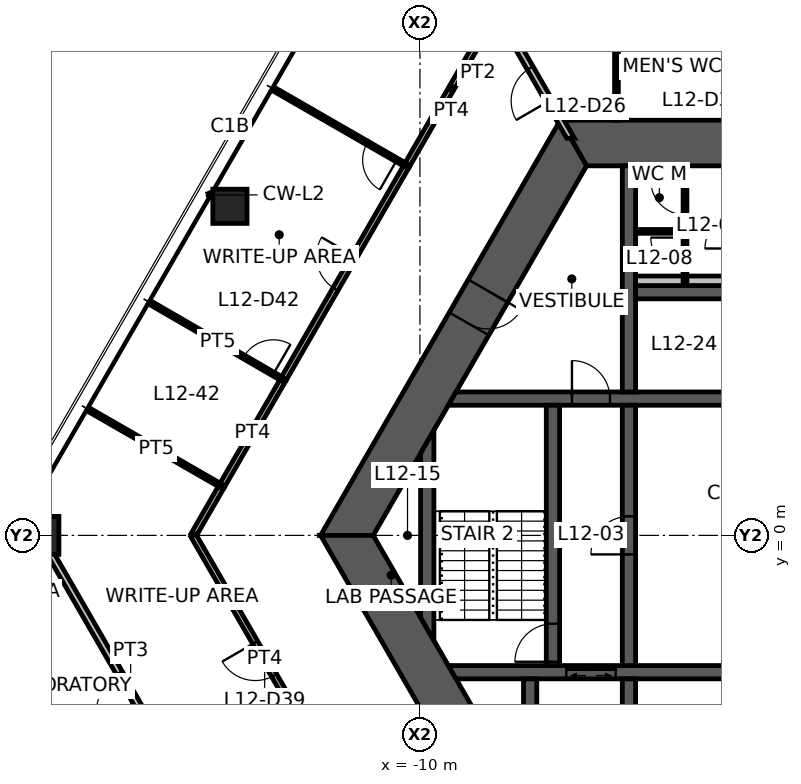
"""IFC4 building model, lengths in metres.
Left out: names, types, materials, properties, quantities, classifications, styles, units other than length and angle.
Written with IfcOpenShell. Run it as: python <this file> out.ifc"""

import sys

from ifc_helpers import new_model, si_unit, direction, frame, frame_2d, origin, origin_2d, place, context, subcontext, project, spatial, polyline, rectangle, hollow_rectangle, outline, extrude, element, fill, save


model = new_model("IFC4")
c1 = context("Model", 3, precision=1e-05, world=origin(), true_north=direction((0.0, 1.0)))
c2 = subcontext(c1, "Body", "Model", "MODEL_VIEW")
j1 = project(units=[si_unit("LENGTHUNIT", "METRE"), si_unit("PLANEANGLEUNIT", "RADIAN")], contexts=[c1])
p1 = place(None, origin())
s1 = spatial("IfcSite", under=j1, at=p1, CompositionType="ELEMENT")
p2 = place(p1, origin())
s2 = spatial("IfcBuilding", under=s1, at=p2, CompositionType="ELEMENT")
p3 = place(p2, frame((0.0, 0.0, 47.8)))
s3 = spatial("IfcBuildingStorey", under=s2, at=p3, CompositionType="ELEMENT", Elevation=47.8)
p4 = place(p3, frame((-20.0, 0.0, 0.0), z_axis=(0.0, 0.0, 1.0), x_axis=(1.0, 0.0, 0.0)))
e1 = element("IfcColumn", 1, at=p4, inside=s3, PredefinedType="COLUMN", context=c2, shape_type="SweptSolid", body=[
    extrude(hollow_rectangle(XDim=1.0, YDim=1.0, WallThickness=0.06, at=origin_2d()), origin(), (0.0, 0.0, 1.0), 4.2),
])
p5 = place(p3, frame((-15.0, 8.66, 0.0), z_axis=(0.0, 0.0, 1.0), x_axis=(1.0, 0.0, 0.0)))
e2 = element("IfcColumn", 2, at=p5, inside=s3, PredefinedType="COLUMN", context=c2, shape_type="SweptSolid", body=[
    extrude(hollow_rectangle(XDim=0.9, YDim=0.9, WallThickness=0.05, at=origin_2d()), origin(), (0.0, 0.0, 1.0), 4.2),
])
p6 = place(p3, frame((5.961, 10.325, 0.0), z_axis=(0.0, 0.0, 1.0), x_axis=(-1.0, 0.0, 0.0)))
e3 = element("IfcWall", 3, at=p6, inside=s3, PredefinedType="SHEAR", context=c2, shape_type="SweptSolid", body=[
    extrude(outline(polyline([(-0.346, -0.6), (4.574, -0.6), (5.474, -0.6), (6.449, -0.6), (7.349, -0.6), (12.269, -0.6), (11.576, 0.6), (7.349, 0.6), (6.449, 0.6), (5.474, 0.6), (4.574, 0.6), (0.346, 0.6), (-0.346, -0.6)])), origin(), (0.0, 0.0, 1.0), 4.2),
])
p7 = place(p6, frame((6.449, 0.0, 0.0)))
e4 = element("IfcOpeningElement", 4, at=p7, cuts=e3, PredefinedType="OPENING", context=c2, shape_type="SweptSolid", body=[
    extrude(rectangle(XDim=0.9, YDim=2.1, at=frame_2d((0.45, 1.05))), frame((0.0, 0.61, 0.0), z_axis=(0.0, -1.0, 0.0), x_axis=(1.0, 0.0, 0.0)), (0.0, 0.0, 1.0), 1.22),
])
p8 = place(p6, frame((4.574, 0.0, 0.0)))
e5 = element("IfcOpeningElement", 5, at=p8, cuts=e3, PredefinedType="OPENING", context=c2, shape_type="SweptSolid", body=[
    extrude(rectangle(XDim=0.9, YDim=2.1, at=frame_2d((0.45, 1.05))), frame((0.0, 0.61, 0.0), z_axis=(0.0, -1.0, 0.0), x_axis=(1.0, 0.0, 0.0)), (0.0, 0.0, 1.0), 1.22),
])
p9 = place(p3, frame((-5.961, 10.325, 0.0), z_axis=(0.0, 0.0, 1.0), x_axis=(-0.500004296715, -0.866022923061, 0.0)))
e6 = element("IfcWall", 6, at=p9, inside=s3, PredefinedType="SHEAR", context=c2, shape_type="SweptSolid", body=[
    extrude(outline(polyline([(-0.346, -0.6), (4.494, -0.6), (5.494, -0.6), (12.269, -0.6), (11.576, 0.6), (5.494, 0.6), (4.494, 0.6), (0.346, 0.6), (-0.346, -0.6)])), origin(), (0.0, 0.0, 1.0), 4.2),
])
p10 = place(p9, frame((4.494, 0.0, 0.0)))
e7 = element("IfcOpeningElement", 7, at=p10, cuts=e6, PredefinedType="OPENING", context=c2, shape_type="SweptSolid", body=[
    extrude(rectangle(XDim=1.0, YDim=2.1, at=frame_2d((0.5, 1.05))), frame((0.0, 0.61, 0.0), z_axis=(0.0, -1.0, 0.0), x_axis=(1.0, 0.0, 0.0)), (0.0, 0.0, 1.0), 1.22),
])
p11 = place(p3, frame((-11.922, 0.0, 0.0), z_axis=(0.0, 0.0, 1.0), x_axis=(0.500004296715, -0.866022923061, 0.0)))
e8 = element("IfcWall", 8, at=p11, inside=s3, PredefinedType="SHEAR", context=c2, shape_type="SweptSolid", body=[
    extrude(outline(polyline([(-0.346, -0.6), (6.431, -0.6), (7.231, -0.6), (12.269, -0.6), (11.576, 0.6), (7.231, 0.6), (6.431, 0.6), (0.346, 0.6), (-0.346, -0.6)])), origin(), (0.0, 0.0, 1.0), 4.2),
])
p12 = place(p11, frame((6.431, 0.0, 0.0)))
e9 = element("IfcOpeningElement", 9, at=p12, cuts=e8, PredefinedType="OPENING", context=c2, shape_type="SweptSolid", body=[
    extrude(rectangle(XDim=0.8, YDim=2.1, at=frame_2d((0.4, 1.05))), frame((0.0, 0.61, 0.0), z_axis=(0.0, -1.0, 0.0), x_axis=(1.0, 0.0, 0.0)), (0.0, 0.0, 1.0), 1.22),
])
p13 = place(p3, frame((-9.151, 3.6, 0.0), z_axis=(0.0, 0.0, 1.0), x_axis=(1.0, 0.0, 0.0)))
e10 = element("IfcWall", 10, at=p13, inside=s3, PredefinedType="SHEAR", context=c2, shape_type="SweptSolid", body=[
    extrude(outline(polyline([(-0.101, -0.175), (3.151, -0.175), (4.151, -0.175), (7.726, -0.175), (7.726, 0.175), (4.151, 0.175), (3.151, 0.175), (0.101, 0.175), (-0.101, -0.175)])), origin(), (0.0, 0.0, 1.0), 4.2),
])
p14 = place(p13, frame((3.151, 0.0, 0.0)))
e11 = element("IfcOpeningElement", 11, at=p14, cuts=e10, PredefinedType="OPENING", context=c2, shape_type="SweptSolid", body=[
    extrude(rectangle(XDim=1.0, YDim=2.1, at=frame_2d((0.5, 1.05))), frame((0.0, 0.185, 0.0), z_axis=(0.0, -1.0, 0.0), x_axis=(1.0, 0.0, 0.0)), (0.0, 0.0, 1.0), 0.37),
])
p15 = place(p3, frame((-9.151, -3.6, 0.0), z_axis=(0.0, 0.0, 1.0), x_axis=(1.0, 0.0, 0.0)))
e12 = element("IfcWall", 12, at=p15, inside=s3, PredefinedType="SHEAR", context=c2, shape_type="SweptSolid", body=[
    extrude(outline(polyline([(0.101, -0.175), (3.001, -0.175), (4.301, -0.175), (7.726, -0.175), (7.726, 0.175), (4.301, 0.175), (3.001, 0.175), (-0.101, 0.175), (0.101, -0.175)])), origin(), (0.0, 0.0, 1.0), 4.2),
])
p16 = place(p15, frame((3.001, 0.0, 0.0)))
e13 = element("IfcOpeningElement", 13, at=p16, cuts=e12, PredefinedType="OPENING", context=c2, shape_type="SweptSolid", body=[
    extrude(rectangle(XDim=1.3, YDim=2.1, at=frame_2d((0.65, 1.05))), frame((0.0, 0.185, 0.0), z_axis=(0.0, -1.0, 0.0), x_axis=(1.0, 0.0, 0.0)), (0.0, 0.0, 1.0), 0.37),
])
p17 = place(p3, frame((-4.5, -3.425, 0.0), z_axis=(0.0, 0.0, 1.0), x_axis=(0.0, 1.0, 0.0)))
e14 = element("IfcWall", 14, at=p17, inside=s3, PredefinedType="SHEAR", context=c2, shape_type="SweptSolid", body=[
    extrude(rectangle(XDim=6.85, YDim=0.35, at=frame_2d((3.425, 0.0))), origin(), (0.0, 0.0, 1.0), 4.2),
])
p18 = place(p17, frame((2.925, 0.0, 0.0)))
e15 = element("IfcOpeningElement", 15, at=p18, cuts=e14, PredefinedType="OPENING", context=c2, shape_type="SweptSolid", body=[
    extrude(rectangle(XDim=1.0, YDim=2.1, at=frame_2d((0.5, 1.05))), frame((0.0, 0.185, 0.0), z_axis=(0.0, -1.0, 0.0), x_axis=(1.0, 0.0, 0.0)), (0.0, 0.0, 1.0), 0.37),
])
p19 = place(p3, frame((-6.5, -3.425, 0.0), z_axis=(0.0, 0.0, 1.0), x_axis=(0.0, 1.0, 0.0)))
e16 = element("IfcWall", 16, at=p19, inside=s3, PredefinedType="SHEAR", context=c2, shape_type="SweptSolid", body=[
    extrude(rectangle(XDim=6.85, YDim=0.35, at=frame_2d((3.425, 0.0))), origin(), (0.0, 0.0, 1.0), 4.2),
])
p20 = place(p19, frame((0.1, 0.0, 0.0)))
e17 = element("IfcOpeningElement", 17, at=p20, cuts=e16, PredefinedType="OPENING", context=c2, shape_type="SweptSolid", body=[
    extrude(rectangle(XDim=1.0, YDim=2.1, at=frame_2d((0.5, 1.05))), frame((0.0, 0.185, 0.0), z_axis=(0.0, -1.0, 0.0), x_axis=(1.0, 0.0, 0.0)), (0.0, 0.0, 1.0), 0.37),
])
for number, where, z_axis, x_axis in (
    (18, (-4.5, 3.775, 0.0), (0.0, 0.0, 1.0), (0.0, 1.0, 0.0)),
    (19, (-4.5, -3.775, 0.0), (0.0, 0.0, 1.0), (0.0, -1.0, 0.0)),
):
    element("IfcWall", number, at=place(p3, frame(where, z_axis=z_axis, x_axis=x_axis)), inside=s3, PredefinedType="SHEAR", context=c2, shape_type="SweptSolid", body=[
        extrude(rectangle(XDim=5.95, YDim=0.35, at=frame_2d((2.975, 0.0))), origin(), (0.0, 0.0, 1.0), 4.2),
    ])
p21 = place(p3, frame((-4.325, 6.4, 0.0), z_axis=(0.0, 0.0, 1.0), x_axis=(1.0, 0.0, 0.0)))
e20 = element("IfcWall", 20, at=p21, inside=s3, PredefinedType="SHEAR", context=c2, shape_type="SweptSolid", body=[
    extrude(rectangle(XDim=2.55, YDim=0.35, at=frame_2d((1.275, 0.0))), origin(), (0.0, 0.0, 1.0), 4.2),
])
p22 = place(p3, frame((-7.1, -3.775, 0.0), z_axis=(0.0, 0.0, 1.0), x_axis=(0.0, -1.0, 0.0)))
e21 = element("IfcWall", 21, at=p22, inside=s3, PredefinedType="SHEAR", context=c2, shape_type="SweptSolid", body=[
    extrude(outline(polyline([(0.0, -0.175), (3.074, -0.175), (3.377, 0.0), (3.4, 0.175), (0.0, 0.175), (0.0, -0.175)])), origin(), (0.0, 0.0, 1.0), 4.2),
])
p23 = place(p3, frame((-9.808, -2.462, 0.0), z_axis=(0.0, 0.0, 1.0), x_axis=(0.0, 1.0, 0.0)))
e22 = element("IfcWall", 22, at=p23, inside=s3, PredefinedType="SHEAR", context=c2, shape_type="SweptSolid", body=[
    extrude(outline(polyline([(-0.303, -0.175), (5.228, -0.175), (4.621, 0.175), (0.303, 0.175), (-0.303, -0.175)])), origin(), (0.0, 0.0, 1.0), 4.2),
])
p24 = place(p3, frame((-4.325, 6.7, 0.0), z_axis=(0.0, 0.0, 1.0), x_axis=(1.0, 0.0, 0.0)))
e23 = element("IfcWall", 23, at=p24, inside=s3, PredefinedType="PLUMBINGWALL", context=c2, shape_type="SweptSolid", body=[
    extrude(rectangle(XDim=2.55, YDim=0.25, at=frame_2d((1.275, 0.0))), origin(), (0.0, 0.0, 1.0), 4.2),
])
p25 = place(p3, frame((-3.025, 6.575, 0.0), z_axis=(0.0, 0.0, 1.0), x_axis=(0.0, 1.0, 0.0)))
e24 = element("IfcWall", 24, at=p25, inside=s3, PredefinedType="PARTITIONING", context=c2, shape_type="SweptSolid", body=[
    extrude(rectangle(XDim=3.15, YDim=0.1, at=frame_2d((1.575, 0.0))), origin(), (0.0, 0.0, 1.0), 2.65),
])
p26 = place(p25, frame((1.863, 0.0, 0.0)))
e25 = element("IfcOpeningElement", 25, at=p26, cuts=e24, PredefinedType="OPENING", context=c2, shape_type="SweptSolid", body=[
    extrude(rectangle(XDim=0.9, YDim=2.1, at=frame_2d((0.45, 1.05))), frame((0.0, 0.06, 0.0), z_axis=(0.0, -1.0, 0.0), x_axis=(1.0, 0.0, 0.0)), (0.0, 0.0, 1.0), 0.12),
])
p27 = place(p25, frame((0.363, 0.0, 0.0)))
e26 = element("IfcOpeningElement", 26, at=p27, cuts=e24, PredefinedType="OPENING", context=c2, shape_type="SweptSolid", body=[
    extrude(rectangle(XDim=0.9, YDim=2.1, at=frame_2d((0.45, 1.05))), frame((0.0, 0.06, 0.0), z_axis=(0.0, -1.0, 0.0), x_axis=(1.0, 0.0, 0.0)), (0.0, 0.0, 1.0), 0.12),
])
p28 = place(p3, frame((-3.075, 8.0, 0.0), z_axis=(0.0, 0.0, 1.0), x_axis=(-1.0, 0.0, 0.0)))
e27 = element("IfcWall", 27, at=p28, inside=s3, PredefinedType="PARTITIONING", context=c2, shape_type="SweptSolid", body=[
    extrude(rectangle(XDim=1.25, YDim=0.1, at=frame_2d((0.625, 0.0))), origin(), (0.0, 0.0, 1.0), 2.65),
])
p29 = place(p3, frame((-6.035, 10.453, 0.0), z_axis=(0.0, 0.0, 1.0), x_axis=(-0.499993402427, 0.866029212861, 0.0)))
e28 = element("IfcWall", 28, at=p29, inside=s3, PredefinedType="PARTITIONING", context=c2, shape_type="SweptSolid", body=[
    extrude(outline(polyline([(-0.051, -0.087), (1.129, -0.087), (2.129, -0.087), (7.93, -0.087), (7.93, 0.087), (2.129, 0.087), (1.129, 0.087), (0.051, 0.087), (-0.051, -0.087)])), origin(), (0.0, 0.0, 1.0), 3.05),
])
p30 = place(p29, frame((1.129, 0.0, 0.0)))
e29 = element("IfcOpeningElement", 29, at=p30, cuts=e28, PredefinedType="OPENING", context=c2, shape_type="SweptSolid", body=[
    extrude(rectangle(XDim=1.0, YDim=2.1, at=frame_2d((0.5, 1.05))), frame((0.0, 0.098, 0.0), z_axis=(0.0, -1.0, 0.0), x_axis=(1.0, 0.0, 0.0)), (0.0, 0.0, 1.0), 0.195),
])
p31 = place(p3, frame((-4.829, 10.925, 0.0), z_axis=(0.0, 0.0, 1.0), x_axis=(0.0, 1.0, 0.0)))
e30 = element("IfcWall", 30, at=p31, inside=s3, PredefinedType="PARTITIONING", context=c2, shape_type="SweptSolid", body=[
    extrude(rectangle(XDim=5.0, YDim=0.1, at=frame_2d((2.5, 0.0))), origin(), (0.0, 0.0, 1.0), 2.65),
])
p32 = place(p3, frame((-15.225, -8.271, 0.0), z_axis=(0.0, 0.0, 1.0), x_axis=(-0.499993908199, 0.866028920859, 0.0)))
e31 = element("IfcWall", 31, at=p32, inside=s3, PredefinedType="PARTITIONING", context=c2, shape_type="SweptSolid", body=[
    extrude(rectangle(XDim=9.55, YDim=0.175, at=frame_2d((4.775, 0.0))), origin(), (0.0, 0.0, 1.0), 2.95),
])
p33 = place(p32, frame((4.175, 0.0, 0.0)))
e32 = element("IfcOpeningElement", 32, at=p33, cuts=e31, PredefinedType="OPENING", context=c2, shape_type="SweptSolid", body=[
    extrude(rectangle(XDim=1.2, YDim=2.1, at=frame_2d((0.6, 1.05))), frame((0.0, 0.098, 0.0), z_axis=(0.0, -1.0, 0.0), x_axis=(1.0, 0.0, 0.0)), (0.0, 0.0, 1.0), 0.195),
])
p34 = place(p3, frame((-10.352, 9.719, 0.0), z_axis=(0.0, 0.0, 1.0), x_axis=(0.499985273446, 0.866033905998, 0.0)))
e33 = element("IfcWall", 33, at=p34, inside=s3, PredefinedType="PARTITIONING", context=c2, shape_type="SweptSolid", body=[
    extrude(rectangle(XDim=4.718, YDim=0.15, at=frame_2d((2.359, 0.0))), origin(), (0.0, 0.0, 1.0), 2.65),
])
p35 = place(p3, frame((-15.222, 1.285, 0.0), z_axis=(0.0, 0.0, 1.0), x_axis=(0.499969057507, 0.866043267704, 0.0)))
e34 = element("IfcWall", 34, at=p35, inside=s3, PredefinedType="PARTITIONING", context=c2, shape_type="SweptSolid", body=[
    extrude(rectangle(XDim=3.257, YDim=0.15, at=frame_2d((1.628, 0.0))), origin(), (0.0, 0.0, 1.0), 2.65),
])
p36 = place(p3, frame((-15.964, 0.0, 0.0), z_axis=(0.0, 0.0, 1.0), x_axis=(0.499901701094, 0.866082149246, 0.0)))
e35 = element("IfcWall", 35, at=p36, inside=s3, PredefinedType="PARTITIONING", context=c2, shape_type="SweptSolid", body=[
    extrude(rectangle(XDim=1.493, YDim=0.15, at=frame_2d((0.747, 0.0))), origin(), (0.0, 0.0, 1.0), 2.65),
])
p37 = place(p3, frame((-12.208, -6.506, 0.0), z_axis=(0.0, 0.0, 1.0), x_axis=(-0.499984092097, 0.866034588021, 0.0)))
e36 = element("IfcWall", 36, at=p37, inside=s3, PredefinedType="PARTITIONING", context=c2, shape_type="SweptSolid", body=[
    extrude(rectangle(XDim=7.512, YDim=0.15, at=frame_2d((3.756, 0.0))), origin(), (0.0, 0.0, 1.0), 2.65),
])
p38 = place(p37, frame((3.256, 0.0, 0.0)))
e37 = element("IfcOpeningElement", 37, at=p38, cuts=e36, PredefinedType="OPENING", context=c2, shape_type="SweptSolid", body=[
    extrude(rectangle(XDim=1.0, YDim=2.1, at=frame_2d((0.5, 1.05))), frame((0.0, 0.085, 0.0), z_axis=(0.0, -1.0, 0.0), x_axis=(1.0, 0.0, 0.0)), (0.0, 0.0, 1.0), 0.17),
])
p39 = place(p3, frame((-13.598, 4.097, 0.0), z_axis=(0.0, 0.0, 1.0), x_axis=(0.49998791073, 0.866032383415, 0.0)))
e38 = element("IfcWall", 38, at=p39, inside=s3, PredefinedType="PARTITIONING", context=c2, shape_type="SweptSolid", body=[
    extrude(rectangle(XDim=6.502, YDim=0.15, at=frame_2d((3.251, 0.0))), origin(), (0.0, 0.0, 1.0), 2.65),
])
p40 = place(p39, frame((2.751, 0.0, 0.0)))
e39 = element("IfcOpeningElement", 39, at=p40, cuts=e38, PredefinedType="OPENING", context=c2, shape_type="SweptSolid", body=[
    extrude(rectangle(XDim=1.0, YDim=2.1, at=frame_2d((0.5, 1.05))), frame((0.0, 0.085, 0.0), z_axis=(0.0, -1.0, 0.0), x_axis=(1.0, 0.0, 0.0)), (0.0, 0.0, 1.0), 0.17),
])
p41 = place(p3, frame((-10.347, 9.728, 0.0), z_axis=(0.0, 0.0, 1.0), x_axis=(-0.866583023507, 0.499032928142, 0.0)))
e40 = element("IfcWall", 40, at=p41, inside=s3, PredefinedType="PARTITIONING", context=c2, shape_type="SweptSolid", body=[
    extrude(rectangle(XDim=3.975, YDim=0.1, at=frame_2d((1.988, 0.0))), origin(), (0.0, 0.0, 1.0), 2.65),
])
p42 = place(p41, frame((0.3, 0.0, 0.0)))
e41 = element("IfcOpeningElement", 41, at=p42, cuts=e40, PredefinedType="OPENING", context=c2, shape_type="SweptSolid", body=[
    extrude(rectangle(XDim=0.9, YDim=2.1, at=frame_2d((0.45, 1.05))), frame((0.0, 0.06, 0.0), z_axis=(0.0, -1.0, 0.0), x_axis=(1.0, 0.0, 0.0)), (0.0, 0.0, 1.0), 0.12),
])
p43 = place(p3, frame((-15.217, 1.293, 0.0), z_axis=(0.0, 0.0, 1.0), x_axis=(-0.866583023507, 0.499032928142, 0.0)))
e42 = element("IfcWall", 42, at=p43, inside=s3, PredefinedType="PARTITIONING", context=c2, shape_type="SweptSolid", body=[
    extrude(rectangle(XDim=3.975, YDim=0.1, at=frame_2d((1.988, 0.0))), origin(), (0.0, 0.0, 1.0), 2.65),
])
p44 = place(p3, frame((-17.039, 6.089, 0.0), z_axis=(0.0, 0.0, 1.0), x_axis=(0.865455715078, -0.500985434159, 0.0)))
e43 = element("IfcWall", 43, at=p44, inside=s3, PredefinedType="PARTITIONING", context=c2, shape_type="SweptSolid", body=[
    extrude(rectangle(XDim=3.976, YDim=0.1, at=frame_2d((1.988, 0.0))), origin(), (0.0, 0.0, 1.0), 2.65),
])
p45 = place(p44, frame((2.776, 0.0, 0.0)))
e44 = element("IfcOpeningElement", 44, at=p45, cuts=e43, PredefinedType="OPENING", context=c2, shape_type="SweptSolid", body=[
    extrude(rectangle(XDim=0.9, YDim=2.1, at=frame_2d((0.45, 1.05))), frame((0.0, 0.06, 0.0), z_axis=(0.0, -1.0, 0.0), x_axis=(1.0, 0.0, 0.0)), (0.0, 0.0, 1.0), 0.12),
])
p46 = place(p3, frame((-19.209, -10.571, 0.0), z_axis=(0.0, 0.0, 1.0), x_axis=(-0.500005203629, 0.866022399447, 0.0)))
e45 = element("IfcWall", 45, at=p46, inside=s3, PredefinedType="PARTITIONING", context=c2, shape_type="SweptSolid", body=[
    extrude(rectangle(XDim=10.14, YDim=0.175, at=frame_2d((5.07, 0.0))), origin(), (0.0, 0.0, 1.0), 3.95),
])
p47 = place(p46, frame((4.025, 0.0, 0.0)))
e46 = element("IfcOpeningElement", 46, at=p47, cuts=e45, PredefinedType="OPENING", context=c2, shape_type="SweptSolid", body=[
    extrude(rectangle(XDim=1.5, YDim=2.1, at=frame_2d((0.75, 1.05))), frame((0.0, 0.098, 0.0), z_axis=(0.0, -1.0, 0.0), x_axis=(1.0, 0.0, 0.0)), (0.0, 0.0, 1.0), 0.195),
])
p48 = place(p10, origin())
e47 = element("IfcDoor", 47, at=p48, inside=s3, OperationType="SINGLE_SWING_LEFT", PredefinedType="DOOR", context=c2, shape_type="SweptSolid", body=[
    extrude(rectangle(XDim=1.0, YDim=2.1, at=frame_2d((0.5, 1.05))), frame((0.0, 0.025, 0.0), z_axis=(0.0, -1.0, 0.0), x_axis=(1.0, 0.0, 0.0)), (0.0, 0.0, 1.0), 0.05),
])
fill(e7, e47)
p49 = place(p18, origin())
e48 = element("IfcDoor", 48, at=p49, inside=s3, OperationType="SINGLE_SWING_LEFT", PredefinedType="DOOR", context=c2, shape_type="SweptSolid", body=[
    extrude(rectangle(XDim=1.0, YDim=2.1, at=frame_2d((0.5, 1.05))), frame((0.0, 0.025, 0.0), z_axis=(0.0, -1.0, 0.0), x_axis=(1.0, 0.0, 0.0)), (0.0, 0.0, 1.0), 0.05),
])
fill(e15, e48)
p50 = place(p20, origin())
e49 = element("IfcDoor", 49, at=p50, inside=s3, OperationType="SINGLE_SWING_LEFT", PredefinedType="DOOR", context=c2, shape_type="SweptSolid", body=[
    extrude(rectangle(XDim=1.0, YDim=2.1, at=frame_2d((0.5, 1.05))), frame((0.0, 0.025, 0.0), z_axis=(0.0, -1.0, 0.0), x_axis=(1.0, 0.0, 0.0)), (0.0, 0.0, 1.0), 0.05),
])
fill(e17, e49)
p51 = place(p14, origin())
e50 = element("IfcDoor", 50, at=p51, inside=s3, OperationType="SINGLE_SWING_LEFT", PredefinedType="DOOR", context=c2, shape_type="SweptSolid", body=[
    extrude(rectangle(XDim=1.0, YDim=2.1, at=frame_2d((0.5, 1.05))), frame((0.0, 0.025, 0.0), z_axis=(0.0, -1.0, 0.0), x_axis=(1.0, 0.0, 0.0)), (0.0, 0.0, 1.0), 0.05),
])
fill(e11, e50)
p52 = place(p26, origin())
e51 = element("IfcDoor", 51, at=p52, inside=s3, OperationType="SINGLE_SWING_RIGHT", PredefinedType="DOOR", context=c2, shape_type="SweptSolid", body=[
    extrude(rectangle(XDim=0.9, YDim=2.1, at=frame_2d((0.45, 1.05))), frame((0.0, 0.025, 0.0), z_axis=(0.0, -1.0, 0.0), x_axis=(1.0, 0.0, 0.0)), (0.0, 0.0, 1.0), 0.05),
])
fill(e25, e51)
p53 = place(p27, origin())
e52 = element("IfcDoor", 52, at=p53, inside=s3, OperationType="SINGLE_SWING_RIGHT", PredefinedType="DOOR", context=c2, shape_type="SweptSolid", body=[
    extrude(rectangle(XDim=0.9, YDim=2.1, at=frame_2d((0.45, 1.05))), frame((0.0, 0.025, 0.0), z_axis=(0.0, -1.0, 0.0), x_axis=(1.0, 0.0, 0.0)), (0.0, 0.0, 1.0), 0.05),
])
fill(e26, e52)
p54 = place(p30, origin())
e53 = element("IfcDoor", 53, at=p54, inside=s3, OperationType="SINGLE_SWING_LEFT", PredefinedType="DOOR", context=c2, shape_type="SweptSolid", body=[
    extrude(rectangle(XDim=1.0, YDim=2.1, at=frame_2d((0.5, 1.05))), frame((0.0, 0.025, 0.0), z_axis=(0.0, -1.0, 0.0), x_axis=(1.0, 0.0, 0.0)), (0.0, 0.0, 1.0), 0.05),
])
fill(e29, e53)
p55 = place(p33, origin())
e54 = element("IfcDoor", 54, at=p55, inside=s3, OperationType="DOUBLE_DOOR_SINGLE_SWING", PredefinedType="DOOR", context=c2, shape_type="SweptSolid", body=[
    extrude(rectangle(XDim=1.2, YDim=2.1, at=frame_2d((0.6, 1.05))), frame((0.0, 0.025, 0.0), z_axis=(0.0, -1.0, 0.0), x_axis=(1.0, 0.0, 0.0)), (0.0, 0.0, 1.0), 0.05),
])
fill(e32, e54)
p56 = place(p38, origin())
e55 = element("IfcDoor", 55, at=p56, inside=s3, OperationType="SINGLE_SWING_RIGHT", PredefinedType="DOOR", context=c2, shape_type="SweptSolid", body=[
    extrude(rectangle(XDim=1.0, YDim=2.1, at=frame_2d((0.5, 1.05))), frame((0.0, 0.025, 0.0), z_axis=(0.0, -1.0, 0.0), x_axis=(1.0, 0.0, 0.0)), (0.0, 0.0, 1.0), 0.05),
])
fill(e37, e55)
p57 = place(p40, origin())
e56 = element("IfcDoor", 56, at=p57, inside=s3, OperationType="SINGLE_SWING_RIGHT", PredefinedType="DOOR", context=c2, shape_type="SweptSolid", body=[
    extrude(rectangle(XDim=1.0, YDim=2.1, at=frame_2d((0.5, 1.05))), frame((0.0, 0.025, 0.0), z_axis=(0.0, -1.0, 0.0), x_axis=(1.0, 0.0, 0.0)), (0.0, 0.0, 1.0), 0.05),
])
fill(e39, e56)
p58 = place(p42, origin())
e57 = element("IfcDoor", 57, at=p58, inside=s3, OperationType="SINGLE_SWING_LEFT", PredefinedType="DOOR", context=c2, shape_type="SweptSolid", body=[
    extrude(rectangle(XDim=0.9, YDim=2.1, at=frame_2d((0.45, 1.05))), frame((0.0, 0.025, 0.0), z_axis=(0.0, -1.0, 0.0), x_axis=(1.0, 0.0, 0.0)), (0.0, 0.0, 1.0), 0.05),
])
fill(e41, e57)
p59 = place(p45, origin())
e58 = element("IfcDoor", 58, at=p59, inside=s3, OperationType="SINGLE_SWING_RIGHT", PredefinedType="DOOR", context=c2, shape_type="SweptSolid", body=[
    extrude(rectangle(XDim=0.9, YDim=2.1, at=frame_2d((0.45, 1.05))), frame((0.0, 0.025, 0.0), z_axis=(0.0, -1.0, 0.0), x_axis=(1.0, 0.0, 0.0)), (0.0, 0.0, 1.0), 0.05),
])
fill(e44, e58)
p60 = place(p16, origin())
e59 = element("IfcDoor", 59, at=p60, inside=s3, OperationType="DOUBLE_DOOR_SLIDING", PredefinedType="DOOR", context=c2, shape_type="SweptSolid", body=[
    extrude(rectangle(XDim=1.3, YDim=2.1, at=frame_2d((0.65, 1.05))), frame((0.0, 0.025, 0.0), z_axis=(0.0, -1.0, 0.0), x_axis=(1.0, 0.0, 0.0)), (0.0, 0.0, 1.0), 0.05),
])
fill(e13, e59)
save(model, sys.argv[1])
